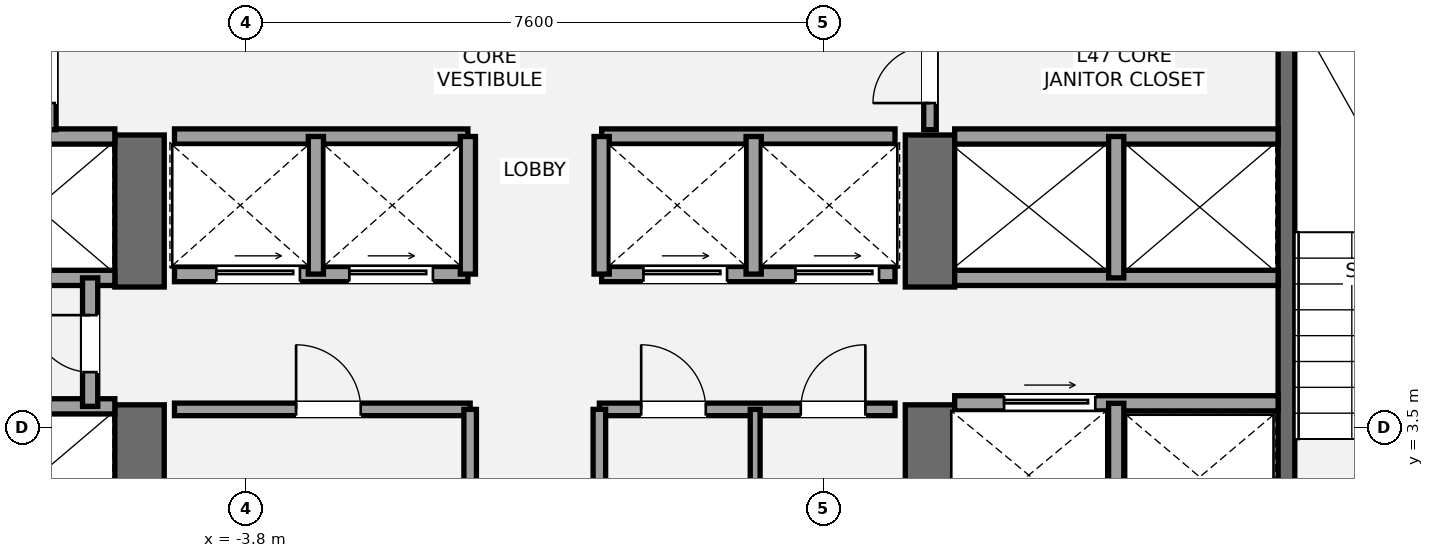
"""IFC4 building model, lengths in metres.
Left out: names, types, materials, properties, quantities, classifications, styles, units other than length and angle.
Written with IfcOpenShell. Run it as: python <this file> out.ifc"""

import sys

from ifc_helpers import new_model, si_unit, direction, frame, frame_2d, origin, place, context, subcontext, project, spatial, rectangle, extrude, element, fill, save


model = new_model("IFC4")
c1 = context("Model", 3, precision=1e-05, world=origin(), true_north=direction((0.0, 1.0)))
c2 = subcontext(c1, "Body", "Model", "MODEL_VIEW")
j1 = project(units=[si_unit("LENGTHUNIT", "METRE"), si_unit("PLANEANGLEUNIT", "RADIAN")], contexts=[c1])
p1 = place(None, origin())
s1 = spatial("IfcSite", under=j1, at=p1, CompositionType="ELEMENT")
p2 = place(p1, origin())
s2 = spatial("IfcBuilding", under=s1, at=p2, CompositionType="ELEMENT")
p3 = place(p2, frame((0.0, 0.0, 172.6)))
s3 = spatial("IfcBuildingStorey", under=s2, at=p3, CompositionType="ELEMENT", Elevation=172.6)
p4 = place(p3, frame((-5.2, 1.2, 0.0), z_axis=(0.0, 0.0, 1.0), x_axis=(0.0, 1.0, 0.0)))
e1 = element("IfcWall", 1, at=p4, inside=s3, PredefinedType="SHEAR", context=c2, shape_type="SweptSolid", body=[
    extrude(rectangle(XDim=2.6, YDim=0.65, at=frame_2d((1.3, 0.0))), origin(), (0.0, 0.0, 1.0), 3.2),
])
p5 = place(p3, frame((-5.2, 5.35, 0.0), z_axis=(0.0, 0.0, 1.0), x_axis=(0.0, 1.0, 0.0)))
e2 = element("IfcWall", 2, at=p5, inside=s3, PredefinedType="SHEAR", context=c2, shape_type="SweptSolid", body=[
    extrude(rectangle(XDim=2.0, YDim=0.65, at=frame_2d((1.0, 0.0))), origin(), (0.0, 0.0, 1.0), 3.2),
])
p6 = place(p3, frame((5.2, 1.2, 0.0), z_axis=(0.0, 0.0, 1.0), x_axis=(0.0, 1.0, 0.0)))
e3 = element("IfcWall", 3, at=p6, inside=s3, PredefinedType="SHEAR", context=c2, shape_type="SweptSolid", body=[
    extrude(rectangle(XDim=2.6, YDim=0.65, at=frame_2d((1.3, 0.0))), origin(), (0.0, 0.0, 1.0), 3.2),
])
p7 = place(p3, frame((5.2, 5.35, 0.0), z_axis=(0.0, 0.0, 1.0), x_axis=(0.0, 1.0, 0.0)))
e4 = element("IfcWall", 4, at=p7, inside=s3, PredefinedType="SHEAR", context=c2, shape_type="SweptSolid", body=[
    extrude(rectangle(XDim=2.0, YDim=0.65, at=frame_2d((1.0, 0.0))), origin(), (0.0, 0.0, 1.0), 3.2),
])
p8 = place(p3, frame((9.89, 1.85, 0.0), z_axis=(0.0, 0.0, 1.0), x_axis=(0.0, 1.0, 0.0)))
e5 = element("IfcWall", 5, at=p8, inside=s3, PredefinedType="SHEAR", context=c2, shape_type="SweptSolid", body=[
    extrude(rectangle(XDim=7.15, YDim=0.22, at=frame_2d((3.575, 0.0))), origin(), (0.0, 0.0, 1.0), 3.2),
])
for number, where, z_axis, x_axis in (
    (6, (-9.78, 3.78, 0.0), (0.0, 0.0, 1.0), (1.0, 0.0, 0.0)),
    (7, (-9.78, 5.47, 0.0), (0.0, 0.0, 1.0), (1.0, 0.0, 0.0)),
    (8, (-9.78, 7.33, 0.0), (0.0, 0.0, 1.0), (1.0, 0.0, 0.0)),
):
    element("IfcWall", number, at=place(p3, frame(where, z_axis=z_axis, x_axis=x_axis)), inside=s3, PredefinedType="SOLIDWALL", context=c2, shape_type="SweptSolid", body=[
        extrude(rectangle(XDim=4.255, YDim=0.2, at=frame_2d((2.127, 0.0))), origin(), (0.0, 0.0, 1.0), 3.02),
    ])
p9 = place(p3, frame((-5.85, 3.78, 0.0), z_axis=(0.0, 0.0, 1.0), x_axis=(0.0, 1.0, 0.0)))
e9 = element("IfcWall", 9, at=p9, inside=s3, PredefinedType="SOLIDWALL", context=c2, shape_type="SweptSolid", body=[
    extrude(rectangle(XDim=1.69, YDim=0.2, at=frame_2d((0.845, 0.0))), origin(), (0.0, 0.0, 1.0), 3.02),
])
p10 = place(p9, frame((0.45, 0.0, 0.0)))
e10 = element("IfcOpeningElement", 10, at=p10, cuts=e9, PredefinedType="OPENING", context=c2, shape_type="SweptSolid", body=[
    extrude(rectangle(XDim=0.75, YDim=2.1, at=frame_2d((0.375, 1.05))), frame((0.0, 0.11, 0.0), z_axis=(0.0, -1.0, 0.0), x_axis=(1.0, 0.0, 0.0)), (0.0, 0.0, 1.0), 0.22),
])
p11 = place(p3, frame((5.525, 3.82, 0.0), z_axis=(0.0, 0.0, 1.0), x_axis=(1.0, 0.0, 0.0)))
e11 = element("IfcWall", 11, at=p11, inside=s3, PredefinedType="SOLIDWALL", context=c2, shape_type="SweptSolid", body=[
    extrude(rectangle(XDim=4.255, YDim=0.2, at=frame_2d((2.127, 0.0))), origin(), (0.0, 0.0, 1.0), 3.02),
])
p12 = place(p11, frame((0.65, 0.0, 0.0)))
e12 = element("IfcOpeningElement", 12, at=p12, cuts=e11, PredefinedType="OPENING", context=c2, shape_type="SweptSolid", body=[
    extrude(rectangle(XDim=1.2, YDim=2.2, at=frame_2d((0.6, 1.1))), frame((0.0, 0.11, 0.0), z_axis=(0.0, -1.0, 0.0), x_axis=(1.0, 0.0, 0.0)), (0.0, 0.0, 1.0), 0.22),
])
p13 = place(p3, frame((7.65, 1.85, 0.0), z_axis=(0.0, 0.0, 1.0), x_axis=(0.0, 1.0, 0.0)))
e13 = element("IfcWall", 13, at=p13, inside=s3, PredefinedType="SOLIDWALL", context=c2, shape_type="SweptSolid", body=[
    extrude(rectangle(XDim=1.97, YDim=0.2, at=frame_2d((0.985, 0.0))), origin(), (0.0, 0.0, 1.0), 3.02),
])
for number, where, z_axis, x_axis in (
    (14, (5.525, 5.47, 0.0), (0.0, 0.0, 1.0), (1.0, 0.0, 0.0)),
    (15, (5.525, 7.33, 0.0), (0.0, 0.0, 1.0), (1.0, 0.0, 0.0)),
):
    element("IfcWall", number, at=place(p3, frame(where, z_axis=z_axis, x_axis=x_axis)), inside=s3, PredefinedType="SOLIDWALL", context=c2, shape_type="SweptSolid", body=[
        extrude(rectangle(XDim=4.255, YDim=0.2, at=frame_2d((2.127, 0.0))), origin(), (0.0, 0.0, 1.0), 3.02),
    ])
p14 = place(p3, frame((7.65, 5.47, 0.0), z_axis=(0.0, 0.0, 1.0), x_axis=(0.0, 1.0, 0.0)))
e16 = element("IfcWall", 16, at=p14, inside=s3, PredefinedType="SOLIDWALL", context=c2, shape_type="SweptSolid", body=[
    extrude(rectangle(XDim=1.86, YDim=0.2, at=frame_2d((0.93, 0.0))), origin(), (0.0, 0.0, 1.0), 3.02),
])
p15 = place(p3, frame((-4.74, 3.74, 0.0), z_axis=(0.0, 0.0, 1.0), x_axis=(1.0, 0.0, 0.0)))
e17 = element("IfcWall", 17, at=p15, inside=s3, PredefinedType="PARTITIONING", context=c2, shape_type="SweptSolid", body=[
    extrude(rectangle(XDim=3.89, YDim=0.165, at=frame_2d((1.945, 0.0))), origin(), (0.0, 0.0, 1.0), 3.02),
])
p16 = place(p15, frame((1.6, 0.0, 0.0)))
e18 = element("IfcOpeningElement", 18, at=p16, cuts=e17, PredefinedType="OPENING", context=c2, shape_type="SweptSolid", body=[
    extrude(rectangle(XDim=0.85, YDim=2.1, at=frame_2d((0.425, 1.05))), frame((0.0, 0.093, 0.0), z_axis=(0.0, -1.0, 0.0), x_axis=(1.0, 0.0, 0.0)), (0.0, 0.0, 1.0), 0.185),
])
p17 = place(p3, frame((-0.85, 1.92, 0.0), z_axis=(0.0, 0.0, 1.0), x_axis=(0.0, 1.0, 0.0)))
e19 = element("IfcWall", 19, at=p17, inside=s3, PredefinedType="PARTITIONING", context=c2, shape_type="SweptSolid", body=[
    extrude(rectangle(XDim=1.82, YDim=0.165, at=frame_2d((0.91, 0.0))), origin(), (0.0, 0.0, 1.0), 3.02),
])
p18 = place(p3, frame((0.85, 3.74, 0.0), z_axis=(0.0, 0.0, 1.0), x_axis=(1.0, 0.0, 0.0)))
e20 = element("IfcWall", 20, at=p18, inside=s3, PredefinedType="PARTITIONING", context=c2, shape_type="SweptSolid", body=[
    extrude(rectangle(XDim=3.89, YDim=0.165, at=frame_2d((1.945, 0.0))), origin(), (0.0, 0.0, 1.0), 3.02),
])
p19 = place(p18, frame((0.55, 0.0, 0.0)))
e21 = element("IfcOpeningElement", 21, at=p19, cuts=e20, PredefinedType="OPENING", context=c2, shape_type="SweptSolid", body=[
    extrude(rectangle(XDim=0.85, YDim=2.1, at=frame_2d((0.425, 1.05))), frame((0.0, 0.093, 0.0), z_axis=(0.0, -1.0, 0.0), x_axis=(1.0, 0.0, 0.0)), (0.0, 0.0, 1.0), 0.185),
])
p20 = place(p18, frame((2.65, 0.0, 0.0)))
e22 = element("IfcOpeningElement", 22, at=p20, cuts=e20, PredefinedType="OPENING", context=c2, shape_type="SweptSolid", body=[
    extrude(rectangle(XDim=0.85, YDim=2.1, at=frame_2d((0.425, 1.05))), frame((0.0, 0.093, 0.0), z_axis=(0.0, -1.0, 0.0), x_axis=(1.0, 0.0, 0.0)), (0.0, 0.0, 1.0), 0.185),
])
p21 = place(p3, frame((0.85, 1.92, 0.0), z_axis=(0.0, 0.0, 1.0), x_axis=(0.0, 1.0, 0.0)))
e23 = element("IfcWall", 23, at=p21, inside=s3, PredefinedType="PARTITIONING", context=c2, shape_type="SweptSolid", body=[
    extrude(rectangle(XDim=1.82, YDim=0.165, at=frame_2d((0.91, 0.0))), origin(), (0.0, 0.0, 1.0), 3.02),
])
p22 = place(p3, frame((2.9, 1.92, 0.0), z_axis=(0.0, 0.0, 1.0), x_axis=(0.0, 1.0, 0.0)))
e24 = element("IfcWall", 24, at=p22, inside=s3, PredefinedType="PARTITIONING", context=c2, shape_type="SweptSolid", body=[
    extrude(rectangle(XDim=1.82, YDim=0.13, at=frame_2d((0.91, 0.0))), origin(), (0.0, 0.0, 1.0), 3.02),
])
p23 = place(p3, frame((-4.74, 5.52, 0.0), z_axis=(0.0, 0.0, 1.0), x_axis=(1.0, 0.0, 0.0)))
e25 = element("IfcWall", 25, at=p23, inside=s3, PredefinedType="SOLIDWALL", context=c2, shape_type="SweptSolid", body=[
    extrude(rectangle(XDim=3.86, YDim=0.2, at=frame_2d((1.93, 0.0))), origin(), (0.0, 0.0, 1.0), 3.02),
])
p24 = place(p23, frame((0.55, 0.0, 0.0)))
e26 = element("IfcOpeningElement", 26, at=p24, cuts=e25, PredefinedType="OPENING", context=c2, shape_type="SweptSolid", body=[
    extrude(rectangle(XDim=1.1, YDim=2.2, at=frame_2d((0.55, 1.1))), frame((0.0, 0.11, 0.0), z_axis=(0.0, -1.0, 0.0), x_axis=(1.0, 0.0, 0.0)), (0.0, 0.0, 1.0), 0.22),
])
p25 = place(p23, frame((2.3, 0.0, 0.0)))
e27 = element("IfcOpeningElement", 27, at=p25, cuts=e25, PredefinedType="OPENING", context=c2, shape_type="SweptSolid", body=[
    extrude(rectangle(XDim=1.1, YDim=2.2, at=frame_2d((0.55, 1.1))), frame((0.0, 0.11, 0.0), z_axis=(0.0, -1.0, 0.0), x_axis=(1.0, 0.0, 0.0)), (0.0, 0.0, 1.0), 0.22),
])
p26 = place(p3, frame((0.88, 5.52, 0.0), z_axis=(0.0, 0.0, 1.0), x_axis=(1.0, 0.0, 0.0)))
e28 = element("IfcWall", 28, at=p26, inside=s3, PredefinedType="SOLIDWALL", context=c2, shape_type="SweptSolid", body=[
    extrude(rectangle(XDim=3.86, YDim=0.2, at=frame_2d((1.93, 0.0))), origin(), (0.0, 0.0, 1.0), 3.02),
])
p27 = place(p26, frame((0.55, 0.0, 0.0)))
e29 = element("IfcOpeningElement", 29, at=p27, cuts=e28, PredefinedType="OPENING", context=c2, shape_type="SweptSolid", body=[
    extrude(rectangle(XDim=1.1, YDim=2.2, at=frame_2d((0.55, 1.1))), frame((0.0, 0.11, 0.0), z_axis=(0.0, -1.0, 0.0), x_axis=(1.0, 0.0, 0.0)), (0.0, 0.0, 1.0), 0.22),
])
p28 = place(p26, frame((2.55, 0.0, 0.0)))
e30 = element("IfcOpeningElement", 30, at=p28, cuts=e28, PredefinedType="OPENING", context=c2, shape_type="SweptSolid", body=[
    extrude(rectangle(XDim=1.1, YDim=2.2, at=frame_2d((0.55, 1.1))), frame((0.0, 0.11, 0.0), z_axis=(0.0, -1.0, 0.0), x_axis=(1.0, 0.0, 0.0)), (0.0, 0.0, 1.0), 0.22),
])
for number, where, z_axis, x_axis in (
    (31, (-4.74, 7.33, 0.0), (0.0, 0.0, 1.0), (1.0, 0.0, 0.0)),
    (32, (0.88, 7.33, 0.0), (0.0, 0.0, 1.0), (1.0, 0.0, 0.0)),
):
    element("IfcWall", number, at=place(p3, frame(where, z_axis=z_axis, x_axis=x_axis)), inside=s3, PredefinedType="SOLIDWALL", context=c2, shape_type="SweptSolid", body=[
        extrude(rectangle(XDim=3.86, YDim=0.2, at=frame_2d((1.93, 0.0))), origin(), (0.0, 0.0, 1.0), 3.02),
    ])
for number, where, z_axis, x_axis in (
    (33, (-2.88, 5.52, 0.0), (0.0, 0.0, 1.0), (0.0, 1.0, 0.0)),
    (34, (2.88, 5.52, 0.0), (0.0, 0.0, 1.0), (0.0, 1.0, 0.0)),
    (35, (-0.88, 5.52, 0.0), (0.0, 0.0, 1.0), (0.0, 1.0, 0.0)),
    (36, (0.88, 5.52, 0.0), (0.0, 0.0, 1.0), (0.0, 1.0, 0.0)),
):
    element("IfcWall", number, at=place(p3, frame(where, z_axis=z_axis, x_axis=x_axis)), inside=s3, PredefinedType="SOLIDWALL", context=c2, shape_type="SweptSolid", body=[
        extrude(rectangle(XDim=1.81, YDim=0.2, at=frame_2d((0.905, 0.0))), origin(), (0.0, 0.0, 1.0), 3.02),
    ])
p29 = place(p3, frame((-6.38, 7.42, 0.0), z_axis=(0.0, 0.0, 1.0), x_axis=(0.0, 1.0, 0.0)))
e37 = element("IfcWall", 37, at=p29, inside=s3, PredefinedType="PARTITIONING", context=c2, shape_type="SweptSolid", body=[
    extrude(rectangle(XDim=1.58, YDim=0.165, at=frame_2d((0.79, 0.0))), origin(), (0.0, 0.0, 1.0), 3.02),
])
p30 = place(p29, frame((0.35, 0.0, 0.0)))
e38 = element("IfcOpeningElement", 38, at=p30, cuts=e37, PredefinedType="OPENING", context=c2, shape_type="SweptSolid", body=[
    extrude(rectangle(XDim=0.75, YDim=2.1, at=frame_2d((0.375, 1.05))), frame((0.0, 0.093, 0.0), z_axis=(0.0, -1.0, 0.0), x_axis=(1.0, 0.0, 0.0)), (0.0, 0.0, 1.0), 0.185),
])
p31 = place(p3, frame((5.2, 7.42, 0.0), z_axis=(0.0, 0.0, 1.0), x_axis=(0.0, 1.0, 0.0)))
e39 = element("IfcWall", 39, at=p31, inside=s3, PredefinedType="PARTITIONING", context=c2, shape_type="SweptSolid", body=[
    extrude(rectangle(XDim=1.58, YDim=0.165, at=frame_2d((0.79, 0.0))), origin(), (0.0, 0.0, 1.0), 3.02),
])
p32 = place(p31, frame((0.35, 0.0, 0.0)))
e40 = element("IfcOpeningElement", 40, at=p32, cuts=e39, PredefinedType="OPENING", context=c2, shape_type="SweptSolid", body=[
    extrude(rectangle(XDim=0.75, YDim=2.1, at=frame_2d((0.375, 1.05))), frame((0.0, 0.093, 0.0), z_axis=(0.0, -1.0, 0.0), x_axis=(1.0, 0.0, 0.0)), (0.0, 0.0, 1.0), 0.185),
])
p33 = place(p10, origin())
e41 = element("IfcDoor", 41, at=p33, inside=s3, OperationType="SINGLE_SWING_RIGHT", PredefinedType="DOOR", context=c2, shape_type="SweptSolid", body=[
    extrude(rectangle(XDim=0.75, YDim=2.1, at=frame_2d((0.375, 1.05))), frame((0.0, 0.025, 0.0), z_axis=(0.0, -1.0, 0.0), x_axis=(1.0, 0.0, 0.0)), (0.0, 0.0, 1.0), 0.05),
])
fill(e10, e41)
p34 = place(p12, origin())
e42 = element("IfcDoor", 42, at=p34, inside=s3, OperationType="SLIDING_TO_RIGHT", PredefinedType="DOOR", context=c2, shape_type="SweptSolid", body=[
    extrude(rectangle(XDim=1.2, YDim=2.2, at=frame_2d((0.6, 1.1))), frame((0.0, 0.025, 0.0), z_axis=(0.0, -1.0, 0.0), x_axis=(1.0, 0.0, 0.0)), (0.0, 0.0, 1.0), 0.05),
])
fill(e12, e42)
p35 = place(p16, origin())
e43 = element("IfcDoor", 43, at=p35, inside=s3, OperationType="SINGLE_SWING_LEFT", PredefinedType="DOOR", context=c2, shape_type="SweptSolid", body=[
    extrude(rectangle(XDim=0.85, YDim=2.1, at=frame_2d((0.425, 1.05))), frame((0.0, 0.025, 0.0), z_axis=(0.0, -1.0, 0.0), x_axis=(1.0, 0.0, 0.0)), (0.0, 0.0, 1.0), 0.05),
])
fill(e18, e43)
p36 = place(p19, origin())
e44 = element("IfcDoor", 44, at=p36, inside=s3, OperationType="SINGLE_SWING_LEFT", PredefinedType="DOOR", context=c2, shape_type="SweptSolid", body=[
    extrude(rectangle(XDim=0.85, YDim=2.1, at=frame_2d((0.425, 1.05))), frame((0.0, 0.025, 0.0), z_axis=(0.0, -1.0, 0.0), x_axis=(1.0, 0.0, 0.0)), (0.0, 0.0, 1.0), 0.05),
])
fill(e21, e44)
p37 = place(p20, origin())
e45 = element("IfcDoor", 45, at=p37, inside=s3, OperationType="SINGLE_SWING_RIGHT", PredefinedType="DOOR", context=c2, shape_type="SweptSolid", body=[
    extrude(rectangle(XDim=0.85, YDim=2.1, at=frame_2d((0.425, 1.05))), frame((0.0, 0.025, 0.0), z_axis=(0.0, -1.0, 0.0), x_axis=(1.0, 0.0, 0.0)), (0.0, 0.0, 1.0), 0.05),
])
fill(e22, e45)
p38 = place(p24, origin())
e46 = element("IfcDoor", 46, at=p38, inside=s3, OperationType="SLIDING_TO_LEFT", PredefinedType="DOOR", context=c2, shape_type="SweptSolid", body=[
    extrude(rectangle(XDim=1.1, YDim=2.2, at=frame_2d((0.55, 1.1))), frame((0.0, 0.025, 0.0), z_axis=(0.0, -1.0, 0.0), x_axis=(1.0, 0.0, 0.0)), (0.0, 0.0, 1.0), 0.05),
])
fill(e26, e46)
p39 = place(p25, origin())
e47 = element("IfcDoor", 47, at=p39, inside=s3, OperationType="SLIDING_TO_LEFT", PredefinedType="DOOR", context=c2, shape_type="SweptSolid", body=[
    extrude(rectangle(XDim=1.1, YDim=2.2, at=frame_2d((0.55, 1.1))), frame((0.0, 0.025, 0.0), z_axis=(0.0, -1.0, 0.0), x_axis=(1.0, 0.0, 0.0)), (0.0, 0.0, 1.0), 0.05),
])
fill(e27, e47)
p40 = place(p27, origin())
e48 = element("IfcDoor", 48, at=p40, inside=s3, OperationType="SLIDING_TO_LEFT", PredefinedType="DOOR", context=c2, shape_type="SweptSolid", body=[
    extrude(rectangle(XDim=1.1, YDim=2.2, at=frame_2d((0.55, 1.1))), frame((0.0, 0.025, 0.0), z_axis=(0.0, -1.0, 0.0), x_axis=(1.0, 0.0, 0.0)), (0.0, 0.0, 1.0), 0.05),
])
fill(e29, e48)
p41 = place(p28, origin())
e49 = element("IfcDoor", 49, at=p41, inside=s3, OperationType="SLIDING_TO_LEFT", PredefinedType="DOOR", context=c2, shape_type="SweptSolid", body=[
    extrude(rectangle(XDim=1.1, YDim=2.2, at=frame_2d((0.55, 1.1))), frame((0.0, 0.025, 0.0), z_axis=(0.0, -1.0, 0.0), x_axis=(1.0, 0.0, 0.0)), (0.0, 0.0, 1.0), 0.05),
])
fill(e30, e49)
p42 = place(p32, origin())
e50 = element("IfcDoor", 50, at=p42, inside=s3, OperationType="SINGLE_SWING_LEFT", PredefinedType="DOOR", context=c2, shape_type="SweptSolid", body=[
    extrude(rectangle(XDim=0.75, YDim=2.1, at=frame_2d((0.375, 1.05))), frame((0.0, 0.025, 0.0), z_axis=(0.0, -1.0, 0.0), x_axis=(1.0, 0.0, 0.0)), (0.0, 0.0, 1.0), 0.05),
])
fill(e40, e50)
save(model, sys.argv[1])
